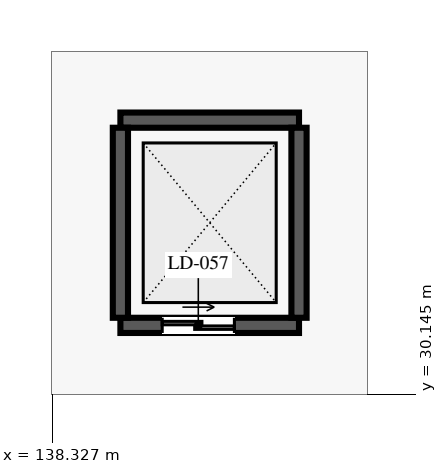
"""IFC4 building model, lengths in metres.
Left out: names, types, materials, properties, quantities, classifications, styles, units other than length and angle.
Written with IfcOpenShell. Run it as: python <this file> out.ifc"""

import sys

from ifc_helpers import new_model, si_unit, direction, frame, frame_2d, origin, place, context, subcontext, project, spatial, rectangle, extrude, element, fill, save


model = new_model("IFC4")
c1 = context("Model", 3, precision=1e-05, world=origin(), true_north=direction((0.0, 1.0)))
c2 = subcontext(c1, "Body", "Model", "MODEL_VIEW")
j1 = project(units=[si_unit("LENGTHUNIT", "METRE"), si_unit("PLANEANGLEUNIT", "RADIAN")], contexts=[c1])
p1 = place(None, origin())
s1 = spatial("IfcSite", under=j1, at=p1, CompositionType="ELEMENT")
p2 = place(p1, origin())
s2 = spatial("IfcBuilding", under=s1, at=p2, CompositionType="ELEMENT")
p3 = place(p2, frame((0.0, 0.0, -4.5)))
s3 = spatial("IfcBuildingStorey", under=s2, at=p3, CompositionType="ELEMENT", Elevation=-4.5)
p4 = place(p3, frame((139.225, 31.05, 0.0), z_axis=(0.0, 0.0, 1.0), x_axis=(1.0, 0.0, 0.0)))
e1 = element("IfcWall", 1, at=p4, inside=s3, PredefinedType="SHEAR", context=c2, shape_type="SweptSolid", body=[
    extrude(rectangle(XDim=2.35, YDim=0.2, at=frame_2d((1.175, 0.0))), origin(), (0.0, 0.0, 1.0), 4.25),
])
p5 = place(p4, frame((0.55, 0.0, 0.0)))
e2 = element("IfcOpeningElement", 2, at=p5, cuts=e1, PredefinedType="OPENING", context=c2, shape_type="SweptSolid", body=[
    extrude(rectangle(XDim=0.95, YDim=2.1, at=frame_2d((0.475, 1.05))), frame((0.0, 0.11, 0.0), z_axis=(0.0, -1.0, 0.0), x_axis=(1.0, 0.0, 0.0)), (0.0, 0.0, 1.0), 0.22),
])
p6 = place(p3, frame((139.225, 33.75, 0.0), z_axis=(0.0, 0.0, 1.0), x_axis=(1.0, 0.0, 0.0)))
e3 = element("IfcWall", 3, at=p6, inside=s3, PredefinedType="SHEAR", context=c2, shape_type="SweptSolid", body=[
    extrude(rectangle(XDim=2.35, YDim=0.2, at=frame_2d((1.175, 0.0))), origin(), (0.0, 0.0, 1.0), 4.25),
])
for number, where, z_axis, x_axis in (
    (4, (139.225, 31.15, 0.0), (0.0, 0.0, 1.0), (0.0, 1.0, 0.0)),
    (5, (141.575, 31.15, 0.0), (0.0, 0.0, 1.0), (0.0, 1.0, 0.0)),
):
    element("IfcWall", number, at=place(p3, frame(where, z_axis=z_axis, x_axis=x_axis)), inside=s3, PredefinedType="SHEAR", context=c2, shape_type="SweptSolid", body=[
        extrude(rectangle(XDim=2.5, YDim=0.2, at=frame_2d((1.25, 0.0))), origin(), (0.0, 0.0, 1.0), 4.25),
    ])
p7 = place(p5, origin())
e6 = element("IfcDoor", 6, at=p7, inside=s3, OperationType="DOUBLE_DOOR_SLIDING", PredefinedType="DOOR", context=c2, shape_type="SweptSolid", body=[
    extrude(rectangle(XDim=0.95, YDim=2.1, at=frame_2d((0.475, 1.05))), frame((0.0, 0.025, 0.0), z_axis=(0.0, -1.0, 0.0), x_axis=(1.0, 0.0, 0.0)), (0.0, 0.0, 1.0), 0.05),
])
fill(e2, e6)
save(model, sys.argv[1])
